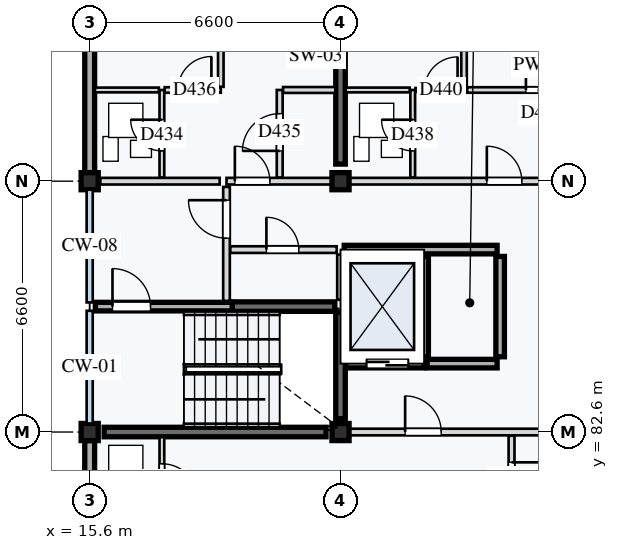
"""IFC4 building model, lengths in metres.
Left out: names, types, materials, properties, quantities, classifications, styles, units other than length and angle.
Written with IfcOpenShell. Run it as: python <this file> out.ifc"""

import sys

from ifc_helpers import new_model, si_unit, direction, frame, frame_2d, origin, origin_2d, place, context, subcontext, project, spatial, rectangle, extrude, element, fill, save


model = new_model("IFC4")
c1 = context("Model", 3, precision=1e-05, world=origin(), true_north=direction((0.0, 1.0)))
c2 = subcontext(c1, "Body", "Model", "MODEL_VIEW")
j1 = project(units=[si_unit("LENGTHUNIT", "METRE"), si_unit("PLANEANGLEUNIT", "RADIAN")], contexts=[c1])
p1 = place(None, origin())
s1 = spatial("IfcSite", under=j1, at=p1, CompositionType="ELEMENT")
p2 = place(p1, origin())
s2 = spatial("IfcBuilding", under=s1, at=p2, CompositionType="ELEMENT")
p3 = place(p2, frame((0.0, 0.0, 43.6)))
s3 = spatial("IfcBuildingStorey", under=s2, at=p3, CompositionType="ELEMENT", Elevation=43.6)
for number, where, z_axis, x_axis in (
    (1, (15.6, 82.6, 0.0), (0.0, 0.0, 1.0), (1.0, 0.0, 0.0)),
    (2, (15.6, 89.2, 0.0), (0.0, 0.0, 1.0), (1.0, 0.0, 0.0)),
    (3, (22.2, 82.6, 0.0), (0.0, 0.0, 1.0), (1.0, 0.0, 0.0)),
    (4, (22.2, 89.2, 0.0), (0.0, 0.0, 1.0), (1.0, 0.0, 0.0)),
):
    element("IfcColumn", number, at=place(p3, frame(where, z_axis=z_axis, x_axis=x_axis)), inside=s3, PredefinedType="COLUMN", context=c2, shape_type="SweptSolid", body=[
        extrude(rectangle(XDim=0.45, YDim=0.45, at=origin_2d()), origin(), (0.0, 0.0, 1.0), 3.2),
    ])
p4 = place(p3, frame((15.98, 82.6, 0.0), z_axis=(0.0, 0.0, 1.0), x_axis=(1.0, 0.0, 0.0)))
e5 = element("IfcWall", 5, at=p4, inside=s3, PredefinedType="SHEAR", context=c2, shape_type="SweptSolid", body=[
    extrude(rectangle(XDim=5.84, YDim=0.25, at=frame_2d((2.92, 0.0))), origin(), (0.0, 0.0, 1.0), 2.98),
])
p5 = place(p3, frame((19.35, 85.9, 0.0), z_axis=(0.0, 0.0, 1.0), x_axis=(1.0, 0.0, 0.0)))
e6 = element("IfcWall", 6, at=p5, inside=s3, PredefinedType="SHEAR", context=c2, shape_type="SweptSolid", body=[
    extrude(rectangle(XDim=2.7, YDim=0.25, at=frame_2d((1.35, 0.0))), origin(), (0.0, 0.0, 1.0), 2.98),
])
p6 = place(p3, frame((22.2, 82.95, 0.0), z_axis=(0.0, 0.0, 1.0), x_axis=(0.0, 1.0, 0.0)))
e7 = element("IfcWall", 7, at=p6, inside=s3, PredefinedType="SHEAR", context=c2, shape_type="SweptSolid", body=[
    extrude(rectangle(XDim=2.8, YDim=0.25, at=frame_2d((1.4, 0.0))), origin(), (0.0, 0.0, 1.0), 2.98),
])
p7 = place(p3, frame((22.2, 89.65, 0.0), z_axis=(0.0, 0.0, 1.0), x_axis=(0.0, 1.0, 0.0)))
e8 = element("IfcWall", 8, at=p7, inside=s3, PredefinedType="SHEAR", context=c2, shape_type="SweptSolid", body=[
    extrude(rectangle(XDim=5.7, YDim=0.25, at=frame_2d((2.85, 0.0))), origin(), (0.0, 0.0, 1.0), 2.98),
])
for number, where, z_axis, x_axis in (
    (9, (15.6, 76.225, 0.0), (0.0, 0.0, 1.0), (0.0, 1.0, 0.0)),
    (10, (15.6, 89.425, 0.0), (0.0, 0.0, 1.0), (0.0, 1.0, 0.0)),
):
    element("IfcWall", number, at=place(p3, frame(where, z_axis=z_axis, x_axis=x_axis)), inside=s3, PredefinedType="STANDARD", context=c2, shape_type="SweptSolid", body=[
        extrude(rectangle(XDim=6.15, YDim=0.26, at=frame_2d((3.075, 0.0))), origin(), (0.0, 0.0, 1.0), 2.65),
    ])
p8 = place(p3, frame((15.75, 85.9, 0.0), z_axis=(0.0, 0.0, 1.0), x_axis=(1.0, 0.0, 0.0)))
e11 = element("IfcWall", 11, at=p8, inside=s3, PredefinedType="STANDARD", context=c2, shape_type="SweptSolid", body=[
    extrude(rectangle(XDim=3.6, YDim=0.225, at=frame_2d((1.8, 0.0))), origin(), (0.0, 0.0, 1.0), 2.98),
])
p9 = place(p8, frame((0.45, 0.0, 0.0)))
e12 = element("IfcOpeningElement", 12, at=p9, cuts=e11, PredefinedType="OPENING", context=c2, shape_type="SweptSolid", body=[
    extrude(rectangle(XDim=1.0, YDim=2.1, at=frame_2d((0.5, 1.05))), frame((0.0, 0.123, 0.0), z_axis=(0.0, -1.0, 0.0), x_axis=(1.0, 0.0, 0.0)), (0.0, 0.0, 1.0), 0.245),
])
p10 = place(p3, frame((19.2, 86.05, 0.0), z_axis=(0.0, 0.0, 1.0), x_axis=(0.0, 1.0, 0.0)))
e13 = element("IfcWall", 13, at=p10, inside=s3, PredefinedType="PARTITIONING", context=c2, shape_type="SweptSolid", body=[
    extrude(rectangle(XDim=3.0, YDim=0.175, at=frame_2d((1.5, 0.0))), origin(), (0.0, 0.0, 1.0), 2.98),
])
p11 = place(p10, frame((1.65, 0.0, 0.0)))
e14 = element("IfcOpeningElement", 14, at=p11, cuts=e13, PredefinedType="OPENING", context=c2, shape_type="SweptSolid", body=[
    extrude(rectangle(XDim=1.0, YDim=2.16, at=frame_2d((0.5, 1.08))), frame((0.0, 0.097, 0.0), z_axis=(0.0, -1.0, 0.0), x_axis=(1.0, 0.0, 0.0)), (0.0, 0.0, 1.0), 0.195),
])
p12 = place(p3, frame((19.3, 87.4, 0.0), z_axis=(0.0, 0.0, 1.0), x_axis=(1.0, 0.0, 0.0)))
e15 = element("IfcWall", 15, at=p12, inside=s3, PredefinedType="PARTITIONING", context=c2, shape_type="SweptSolid", body=[
    extrude(rectangle(XDim=2.8, YDim=0.175, at=frame_2d((1.4, 0.0))), origin(), (0.0, 0.0, 1.0), 2.98),
])
p13 = place(p12, frame((0.95, 0.0, 0.0)))
e16 = element("IfcOpeningElement", 16, at=p13, cuts=e15, PredefinedType="OPENING", context=c2, shape_type="SweptSolid", body=[
    extrude(rectangle(XDim=0.85, YDim=2.0, at=frame_2d((0.425, 1.0))), frame((0.0, 0.097, 0.0), z_axis=(0.0, -1.0, 0.0), x_axis=(1.0, 0.0, 0.0)), (0.0, 0.0, 1.0), 0.195),
])
p14 = place(p3, frame((22.2, 86.08, 0.0), z_axis=(0.0, 0.0, 1.0), x_axis=(0.0, 1.0, 0.0)))
e17 = element("IfcWall", 17, at=p14, inside=s3, PredefinedType="PARTITIONING", context=c2, shape_type="SweptSolid", body=[
    extrude(rectangle(XDim=1.19, YDim=0.175, at=frame_2d((0.595, 0.0))), origin(), (0.0, 0.0, 1.0), 2.98),
])
p15 = place(p3, frame((22.335, 84.4, 0.0), z_axis=(0.0, 0.0, 1.0), x_axis=(1.0, 0.0, 0.0)))
e18 = element("IfcWall", 18, at=p15, inside=s3, PredefinedType="STANDARD", context=c2, shape_type="SweptSolid", body=[
    extrude(rectangle(XDim=2.065, YDim=0.225, at=frame_2d((1.032, 0.0))), origin(), (0.0, 0.0, 1.0), 2.98),
])
p16 = place(p15, frame((0.55, 0.0, 0.0)))
e19 = element("IfcOpeningElement", 19, at=p16, cuts=e18, PredefinedType="OPENING", context=c2, shape_type="SweptSolid", body=[
    extrude(rectangle(XDim=1.1, YDim=2.1, at=frame_2d((0.55, 1.05))), frame((0.0, 0.123, 0.0), z_axis=(0.0, -1.0, 0.0), x_axis=(1.0, 0.0, 0.0)), (0.0, 0.0, 1.0), 0.245),
])
p17 = place(p3, frame((24.48, 84.4, 0.0), z_axis=(0.0, 0.0, 1.0), x_axis=(1.0, 0.0, 0.0)))
e20 = element("IfcWall", 20, at=p17, inside=s3, PredefinedType="STANDARD", context=c2, shape_type="SweptSolid", body=[
    extrude(rectangle(XDim=1.84, YDim=0.225, at=frame_2d((0.92, 0.0))), origin(), (0.0, 0.0, 1.0), 2.98),
])
p18 = place(p3, frame((22.298, 87.4, 0.0), z_axis=(0.0, 0.0, 1.0), x_axis=(1.0, 0.0, 0.0)))
e21 = element("IfcWall", 21, at=p18, inside=s3, PredefinedType="STANDARD", context=c2, shape_type="SweptSolid", body=[
    extrude(rectangle(XDim=4.022, YDim=0.225, at=frame_2d((2.011, 0.0))), origin(), (0.0, 0.0, 1.0), 2.98),
])
for number, where, z_axis, x_axis in (
    (22, (24.4, 84.58, 0.0), (0.0, 0.0, 1.0), (0.0, 1.0, 0.0)),
    (23, (26.4, 84.58, 0.0), (0.0, 0.0, 1.0), (0.0, 1.0, 0.0)),
):
    element("IfcWall", number, at=place(p3, frame(where, z_axis=z_axis, x_axis=x_axis)), inside=s3, PredefinedType="STANDARD", context=c2, shape_type="SweptSolid", body=[
        extrude(rectangle(XDim=2.64, YDim=0.225, at=frame_2d((1.32, 0.0))), origin(), (0.0, 0.0, 1.0), 2.98),
    ])
p19 = place(p3, frame((22.2, 82.6, 0.0), z_axis=(0.0, 0.0, 1.0), x_axis=(1.0, 0.0, 0.0)))
e24 = element("IfcWall", 24, at=p19, inside=s3, PredefinedType="PARTITIONING", context=c2, shape_type="SweptSolid", body=[
    extrude(rectangle(XDim=6.6, YDim=0.175, at=frame_2d((3.3, 0.0))), origin(), (0.0, 0.0, 1.0), 2.7),
])
p20 = place(p19, frame((1.7, 0.0, 0.0)))
e25 = element("IfcOpeningElement", 25, at=p20, cuts=e24, PredefinedType="OPENING", context=c2, shape_type="SweptSolid", body=[
    extrude(rectangle(XDim=0.95, YDim=2.1, at=frame_2d((0.475, 1.05))), frame((0.0, 0.097, 0.0), z_axis=(0.0, -1.0, 0.0), x_axis=(1.0, 0.0, 0.0)), (0.0, 0.0, 1.0), 0.195),
])
p21 = place(p3, frame((17.5, 82.465, 0.0), z_axis=(0.0, 0.0, 1.0), x_axis=(0.0, -1.0, 0.0)))
e26 = element("IfcWall", 26, at=p21, inside=s3, PredefinedType="PARTITIONING", context=c2, shape_type="SweptSolid", body=[
    extrude(rectangle(XDim=2.265, YDim=0.125, at=frame_2d((1.133, 0.0))), origin(), (0.0, 0.0, 1.0), 2.98),
])
p22 = place(p21, frame((0.7, 0.0, 0.0)))
e27 = element("IfcOpeningElement", 27, at=p22, cuts=e26, PredefinedType="OPENING", context=c2, shape_type="SweptSolid", body=[
    extrude(rectangle(XDim=0.94, YDim=2.08, at=frame_2d((0.47, 1.04))), frame((0.0, 0.073, 0.0), z_axis=(0.0, -1.0, 0.0), x_axis=(1.0, 0.0, 0.0)), (0.0, 0.0, 1.0), 0.145),
])
p23 = place(p3, frame((26.7, 82.502, 0.0), z_axis=(0.0, 0.0, 1.0), x_axis=(0.0, -1.0, 0.0)))
e28 = element("IfcWall", 28, at=p23, inside=s3, PredefinedType="PARTITIONING", context=c2, shape_type="SweptSolid", body=[
    extrude(rectangle(XDim=2.302, YDim=0.155, at=frame_2d((1.151, 0.0))), origin(), (0.0, 0.0, 1.0), 2.98),
])
p24 = place(p23, frame((0.7, 0.0, 0.0)))
e29 = element("IfcOpeningElement", 29, at=p24, cuts=e28, PredefinedType="OPENING", context=c2, shape_type="SweptSolid", body=[
    extrude(rectangle(XDim=0.9, YDim=2.16, at=frame_2d((0.45, 1.08))), frame((0.0, 0.087, 0.0), z_axis=(0.0, -1.0, 0.0), x_axis=(1.0, 0.0, 0.0)), (0.0, 0.0, 1.0), 0.175),
])
p25 = place(p3, frame((15.88, 89.2, 0.0), z_axis=(0.0, 0.0, 1.0), x_axis=(1.0, 0.0, 0.0)))
e30 = element("IfcWall", 30, at=p25, inside=s3, PredefinedType="PARTITIONING", context=c2, shape_type="SweptSolid", body=[
    extrude(rectangle(XDim=3.14, YDim=0.175, at=frame_2d((1.57, 0.0))), origin(), (0.0, 0.0, 1.0), 2.7),
])
p26 = place(p3, frame((19.2, 89.2, 0.0), z_axis=(0.0, 0.0, 1.0), x_axis=(1.0, 0.0, 0.0)))
e31 = element("IfcWall", 31, at=p26, inside=s3, PredefinedType="PARTITIONING", context=c2, shape_type="SweptSolid", body=[
    extrude(rectangle(XDim=3.0, YDim=0.175, at=frame_2d((1.5, 0.0))), origin(), (0.0, 0.0, 1.0), 2.7),
])
p27 = place(p26, frame((0.22, 0.0, 0.0)))
e32 = element("IfcOpeningElement", 32, at=p27, cuts=e31, PredefinedType="OPENING", context=c2, shape_type="SweptSolid", body=[
    extrude(rectangle(XDim=0.92, YDim=2.14, at=frame_2d((0.46, 1.07))), frame((0.0, 0.097, 0.0), z_axis=(0.0, -1.0, 0.0), x_axis=(1.0, 0.0, 0.0)), (0.0, 0.0, 1.0), 0.195),
])
p28 = place(p3, frame((17.5, 89.298, 0.0), z_axis=(0.0, 0.0, 1.0), x_axis=(0.0, 1.0, 0.0)))
e33 = element("IfcWall", 33, at=p28, inside=s3, PredefinedType="PARTITIONING", context=c2, shape_type="SweptSolid", body=[
    extrude(rectangle(XDim=2.302, YDim=0.125, at=frame_2d((1.151, 0.0))), origin(), (0.0, 0.0, 1.0), 2.98),
])
p29 = place(p28, frame((0.7, 0.0, 0.0)))
e34 = element("IfcOpeningElement", 34, at=p29, cuts=e33, PredefinedType="OPENING", context=c2, shape_type="SweptSolid", body=[
    extrude(rectangle(XDim=0.82, YDim=2.05, at=frame_2d((0.41, 1.025))), frame((0.0, 0.073, 0.0), z_axis=(0.0, -1.0, 0.0), x_axis=(1.0, 0.0, 0.0)), (0.0, 0.0, 1.0), 0.145),
])
p30 = place(p3, frame((15.74, 91.6, 0.0), z_axis=(0.0, 0.0, 1.0), x_axis=(1.0, 0.0, 0.0)))
e35 = element("IfcWall", 35, at=p30, inside=s3, PredefinedType="PARTITIONING", context=c2, shape_type="SweptSolid", body=[
    extrude(rectangle(XDim=1.68, YDim=0.125, at=frame_2d((0.84, 0.0))), origin(), (0.0, 0.0, 1.0), 2.98),
])
p31 = place(p3, frame((20.6, 89.298, 0.0), z_axis=(0.0, 0.0, 1.0), x_axis=(0.0, 1.0, 0.0)))
e36 = element("IfcWall", 36, at=p31, inside=s3, PredefinedType="PARTITIONING", context=c2, shape_type="SweptSolid", body=[
    extrude(rectangle(XDim=2.302, YDim=0.155, at=frame_2d((1.151, 0.0))), origin(), (0.0, 0.0, 1.0), 2.98),
])
p32 = place(p31, frame((0.7, 0.0, 0.0)))
e37 = element("IfcOpeningElement", 37, at=p32, cuts=e36, PredefinedType="OPENING", context=c2, shape_type="SweptSolid", body=[
    extrude(rectangle(XDim=0.98, YDim=2.12, at=frame_2d((0.49, 1.06))), frame((0.0, 0.087, 0.0), z_axis=(0.0, -1.0, 0.0), x_axis=(1.0, 0.0, 0.0)), (0.0, 0.0, 1.0), 0.175),
])
p33 = place(p3, frame((20.688, 91.6, 0.0), z_axis=(0.0, 0.0, 1.0), x_axis=(1.0, 0.0, 0.0)))
e38 = element("IfcWall", 38, at=p33, inside=s3, PredefinedType="PARTITIONING", context=c2, shape_type="SweptSolid", body=[
    extrude(rectangle(XDim=1.377, YDim=0.155, at=frame_2d((0.689, 0.0))), origin(), (0.0, 0.0, 1.0), 2.98),
])
p34 = place(p3, frame((17.573, 91.6, 0.0), z_axis=(0.0, 0.0, 1.0), x_axis=(1.0, 0.0, 0.0)))
e39 = element("IfcWall", 39, at=p34, inside=s3, PredefinedType="PARTITIONING", context=c2, shape_type="SweptSolid", body=[
    extrude(rectangle(XDim=1.478, YDim=0.145, at=frame_2d((0.739, 0.0))), origin(), (0.0, 0.0, 1.0), 2.98),
])
p35 = place(p34, frame((0.35, 0.0, 0.0)))
e40 = element("IfcOpeningElement", 40, at=p35, cuts=e39, PredefinedType="OPENING", context=c2, shape_type="SweptSolid", body=[
    extrude(rectangle(XDim=0.88, YDim=2.1, at=frame_2d((0.44, 1.05))), frame((0.0, 0.083, 0.0), z_axis=(0.0, -1.0, 0.0), x_axis=(1.0, 0.0, 0.0)), (0.0, 0.0, 1.0), 0.165),
])
p36 = place(p3, frame((19.05, 91.683, 0.0), z_axis=(0.0, 0.0, 1.0), x_axis=(0.0, 1.0, 0.0)))
e41 = element("IfcWall", 41, at=p36, inside=s3, PredefinedType="PARTITIONING", context=c2, shape_type="SweptSolid", body=[
    extrude(rectangle(XDim=3.977, YDim=0.145, at=frame_2d((1.989, 0.0))), origin(), (0.0, 0.0, 1.0), 2.98),
])
p37 = place(p3, frame((22.2, 89.2, 0.0), z_axis=(0.0, 0.0, 1.0), x_axis=(1.0, 0.0, 0.0)))
e42 = element("IfcWall", 42, at=p37, inside=s3, PredefinedType="PARTITIONING", context=c2, shape_type="SweptSolid", body=[
    extrude(rectangle(XDim=6.6, YDim=0.175, at=frame_2d((3.3, 0.0))), origin(), (0.0, 0.0, 1.0), 2.7),
])
p38 = place(p37, frame((3.85, 0.0, 0.0)))
e43 = element("IfcOpeningElement", 43, at=p38, cuts=e42, PredefinedType="OPENING", context=c2, shape_type="SweptSolid", body=[
    extrude(rectangle(XDim=0.92, YDim=2.14, at=frame_2d((0.46, 1.07))), frame((0.0, 0.097, 0.0), z_axis=(0.0, -1.0, 0.0), x_axis=(1.0, 0.0, 0.0)), (0.0, 0.0, 1.0), 0.195),
])
p39 = place(p3, frame((24.1, 89.298, 0.0), z_axis=(0.0, 0.0, 1.0), x_axis=(0.0, 1.0, 0.0)))
e44 = element("IfcWall", 44, at=p39, inside=s3, PredefinedType="PARTITIONING", context=c2, shape_type="SweptSolid", body=[
    extrude(rectangle(XDim=2.302, YDim=0.125, at=frame_2d((1.151, 0.0))), origin(), (0.0, 0.0, 1.0), 2.98),
])
p40 = place(p39, frame((0.7, 0.0, 0.0)))
e45 = element("IfcOpeningElement", 45, at=p40, cuts=e44, PredefinedType="OPENING", context=c2, shape_type="SweptSolid", body=[
    extrude(rectangle(XDim=0.82, YDim=2.05, at=frame_2d((0.41, 1.025))), frame((0.0, 0.073, 0.0), z_axis=(0.0, -1.0, 0.0), x_axis=(1.0, 0.0, 0.0)), (0.0, 0.0, 1.0), 0.145),
])
p41 = place(p3, frame((22.335, 91.6, 0.0), z_axis=(0.0, 0.0, 1.0), x_axis=(1.0, 0.0, 0.0)))
e46 = element("IfcWall", 46, at=p41, inside=s3, PredefinedType="PARTITIONING", context=c2, shape_type="SweptSolid", body=[
    extrude(rectangle(XDim=1.685, YDim=0.125, at=frame_2d((0.843, 0.0))), origin(), (0.0, 0.0, 1.0), 2.98),
])
p42 = place(p3, frame((24.173, 91.6, 0.0), z_axis=(0.0, 0.0, 1.0), x_axis=(1.0, 0.0, 0.0)))
e47 = element("IfcWall", 47, at=p42, inside=s3, PredefinedType="PARTITIONING", context=c2, shape_type="SweptSolid", body=[
    extrude(rectangle(XDim=1.277, YDim=0.105, at=frame_2d((0.639, 0.0))), origin(), (0.0, 0.0, 1.0), 2.98),
])
p43 = place(p42, frame((0.238, 0.0, 0.0)))
e48 = element("IfcOpeningElement", 48, at=p43, cuts=e47, PredefinedType="OPENING", context=c2, shape_type="SweptSolid", body=[
    extrude(rectangle(XDim=0.87, YDim=2.08, at=frame_2d((0.435, 1.04))), frame((0.0, 0.062, 0.0), z_axis=(0.0, -1.0, 0.0), x_axis=(1.0, 0.0, 0.0)), (0.0, 0.0, 1.0), 0.125),
])
p44 = place(p3, frame((25.45, 91.68, 0.0), z_axis=(0.0, 0.0, 1.0), x_axis=(0.0, 1.0, 0.0)))
e49 = element("IfcWall", 49, at=p44, inside=s3, PredefinedType="PARTITIONING", context=c2, shape_type="SweptSolid", body=[
    extrude(rectangle(XDim=3.98, YDim=0.145, at=frame_2d((1.99, 0.0))), origin(), (0.0, 0.0, 1.0), 2.98),
])
p45 = place(p3, frame((25.532, 91.6, 0.0), z_axis=(0.0, 0.0, 1.0), x_axis=(1.0, 0.0, 0.0)))
e50 = element("IfcWall", 50, at=p45, inside=s3, PredefinedType="PARTITIONING", context=c2, shape_type="SweptSolid", body=[
    extrude(rectangle(XDim=3.86, YDim=0.145, at=frame_2d((1.93, 0.0))), origin(), (0.0, 0.0, 1.0), 2.98),
])
p46 = place(p45, frame((1.546, 0.0, 0.0)))
e51 = element("IfcOpeningElement", 51, at=p46, cuts=e50, PredefinedType="OPENING", context=c2, shape_type="SweptSolid", body=[
    extrude(rectangle(XDim=0.85, YDim=2.1, at=frame_2d((0.425, 1.05))), frame((0.0, 0.083, 0.0), z_axis=(0.0, -1.0, 0.0), x_axis=(1.0, 0.0, 0.0)), (0.0, 0.0, 1.0), 0.165),
])
p47 = place(p9, origin())
e52 = element("IfcDoor", 52, at=p47, inside=s3, OperationType="SINGLE_SWING_LEFT", PredefinedType="DOOR", context=c2, shape_type="SweptSolid", body=[
    extrude(rectangle(XDim=1.0, YDim=2.1, at=frame_2d((0.5, 1.05))), frame((0.0, 0.025, 0.0), z_axis=(0.0, -1.0, 0.0), x_axis=(1.0, 0.0, 0.0)), (0.0, 0.0, 1.0), 0.05),
])
fill(e12, e52)
p48 = place(p11, origin())
e53 = element("IfcDoor", 53, at=p48, inside=s3, OperationType="SINGLE_SWING_RIGHT", PredefinedType="DOOR", context=c2, shape_type="SweptSolid", body=[
    extrude(rectangle(XDim=1.0, YDim=2.16, at=frame_2d((0.5, 1.08))), frame((0.0, 0.025, 0.0), z_axis=(0.0, -1.0, 0.0), x_axis=(1.0, 0.0, 0.0)), (0.0, 0.0, 1.0), 0.05),
])
fill(e14, e53)
p49 = place(p13, origin())
e54 = element("IfcDoor", 54, at=p49, inside=s3, OperationType="SINGLE_SWING_LEFT", PredefinedType="DOOR", context=c2, shape_type="SweptSolid", body=[
    extrude(rectangle(XDim=0.85, YDim=2.0, at=frame_2d((0.425, 1.0))), frame((0.0, 0.025, 0.0), z_axis=(0.0, -1.0, 0.0), x_axis=(1.0, 0.0, 0.0)), (0.0, 0.0, 1.0), 0.05),
])
fill(e16, e54)
p50 = place(p16, origin())
e55 = element("IfcDoor", 55, at=p50, inside=s3, OperationType="DOUBLE_DOOR_SLIDING", PredefinedType="DOOR", context=c2, shape_type="SweptSolid", body=[
    extrude(rectangle(XDim=1.1, YDim=2.1, at=frame_2d((0.55, 1.05))), frame((0.0, 0.025, 0.0), z_axis=(0.0, -1.0, 0.0), x_axis=(1.0, 0.0, 0.0)), (0.0, 0.0, 1.0), 0.05),
])
fill(e19, e55)
p51 = place(p20, origin())
e56 = element("IfcDoor", 56, at=p51, inside=s3, OperationType="SINGLE_SWING_LEFT", PredefinedType="DOOR", context=c2, shape_type="SweptSolid", body=[
    extrude(rectangle(XDim=0.95, YDim=2.1, at=frame_2d((0.475, 1.05))), frame((0.0, 0.025, 0.0), z_axis=(0.0, -1.0, 0.0), x_axis=(1.0, 0.0, 0.0)), (0.0, 0.0, 1.0), 0.05),
])
fill(e25, e56)
p52 = place(p22, origin())
e57 = element("IfcDoor", 57, at=p52, inside=s3, OperationType="SINGLE_SWING_RIGHT", PredefinedType="DOOR", context=c2, shape_type="SweptSolid", body=[
    extrude(rectangle(XDim=0.94, YDim=2.08, at=frame_2d((0.47, 1.04))), frame((0.0, 0.025, 0.0), z_axis=(0.0, -1.0, 0.0), x_axis=(1.0, 0.0, 0.0)), (0.0, 0.0, 1.0), 0.05),
])
fill(e27, e57)
p53 = place(p24, origin())
e58 = element("IfcDoor", 58, at=p53, inside=s3, OperationType="SINGLE_SWING_LEFT", PredefinedType="DOOR", context=c2, shape_type="SweptSolid", body=[
    extrude(rectangle(XDim=0.9, YDim=2.16, at=frame_2d((0.45, 1.08))), frame((0.0, 0.025, 0.0), z_axis=(0.0, -1.0, 0.0), x_axis=(1.0, 0.0, 0.0)), (0.0, 0.0, 1.0), 0.05),
])
fill(e29, e58)
p54 = place(p27, origin())
e59 = element("IfcDoor", 59, at=p54, inside=s3, OperationType="SINGLE_SWING_LEFT", PredefinedType="DOOR", context=c2, shape_type="SweptSolid", body=[
    extrude(rectangle(XDim=0.92, YDim=2.14, at=frame_2d((0.46, 1.07))), frame((0.0, 0.025, 0.0), z_axis=(0.0, -1.0, 0.0), x_axis=(1.0, 0.0, 0.0)), (0.0, 0.0, 1.0), 0.05),
])
fill(e32, e59)
p55 = place(p29, origin())
e60 = element("IfcDoor", 60, at=p55, inside=s3, OperationType="SINGLE_SWING_RIGHT", PredefinedType="DOOR", context=c2, shape_type="SweptSolid", body=[
    extrude(rectangle(XDim=0.82, YDim=2.05, at=frame_2d((0.41, 1.025))), frame((0.0, 0.025, 0.0), z_axis=(0.0, -1.0, 0.0), x_axis=(1.0, 0.0, 0.0)), (0.0, 0.0, 1.0), 0.05),
])
fill(e34, e60)
p56 = place(p32, origin())
e61 = element("IfcDoor", 61, at=p56, inside=s3, OperationType="SINGLE_SWING_LEFT", PredefinedType="DOOR", context=c2, shape_type="SweptSolid", body=[
    extrude(rectangle(XDim=0.98, YDim=2.12, at=frame_2d((0.49, 1.06))), frame((0.0, 0.025, 0.0), z_axis=(0.0, -1.0, 0.0), x_axis=(1.0, 0.0, 0.0)), (0.0, 0.0, 1.0), 0.05),
])
fill(e37, e61)
p57 = place(p35, origin())
e62 = element("IfcDoor", 62, at=p57, inside=s3, OperationType="SINGLE_SWING_RIGHT", PredefinedType="DOOR", context=c2, shape_type="SweptSolid", body=[
    extrude(rectangle(XDim=0.88, YDim=2.1, at=frame_2d((0.44, 1.05))), frame((0.0, 0.025, 0.0), z_axis=(0.0, -1.0, 0.0), x_axis=(1.0, 0.0, 0.0)), (0.0, 0.0, 1.0), 0.05),
])
fill(e40, e62)
p58 = place(p38, origin())
e63 = element("IfcDoor", 63, at=p58, inside=s3, OperationType="SINGLE_SWING_LEFT", PredefinedType="DOOR", context=c2, shape_type="SweptSolid", body=[
    extrude(rectangle(XDim=0.92, YDim=2.14, at=frame_2d((0.46, 1.07))), frame((0.0, 0.025, 0.0), z_axis=(0.0, -1.0, 0.0), x_axis=(1.0, 0.0, 0.0)), (0.0, 0.0, 1.0), 0.05),
])
fill(e43, e63)
p59 = place(p40, origin())
e64 = element("IfcDoor", 64, at=p59, inside=s3, OperationType="SINGLE_SWING_RIGHT", PredefinedType="DOOR", context=c2, shape_type="SweptSolid", body=[
    extrude(rectangle(XDim=0.82, YDim=2.05, at=frame_2d((0.41, 1.025))), frame((0.0, 0.025, 0.0), z_axis=(0.0, -1.0, 0.0), x_axis=(1.0, 0.0, 0.0)), (0.0, 0.0, 1.0), 0.05),
])
fill(e45, e64)
p60 = place(p43, origin())
e65 = element("IfcDoor", 65, at=p60, inside=s3, OperationType="SINGLE_SWING_RIGHT", PredefinedType="DOOR", context=c2, shape_type="SweptSolid", body=[
    extrude(rectangle(XDim=0.87, YDim=2.08, at=frame_2d((0.435, 1.04))), frame((0.0, 0.025, 0.0), z_axis=(0.0, -1.0, 0.0), x_axis=(1.0, 0.0, 0.0)), (0.0, 0.0, 1.0), 0.05),
])
fill(e48, e65)
p61 = place(p46, origin())
e66 = element("IfcDoor", 66, at=p61, inside=s3, OperationType="SINGLE_SWING_LEFT", PredefinedType="DOOR", context=c2, shape_type="SweptSolid", body=[
    extrude(rectangle(XDim=0.85, YDim=2.1, at=frame_2d((0.425, 1.05))), frame((0.0, 0.025, 0.0), z_axis=(0.0, -1.0, 0.0), x_axis=(1.0, 0.0, 0.0)), (0.0, 0.0, 1.0), 0.05),
])
fill(e51, e66)
save(model, sys.argv[1])
